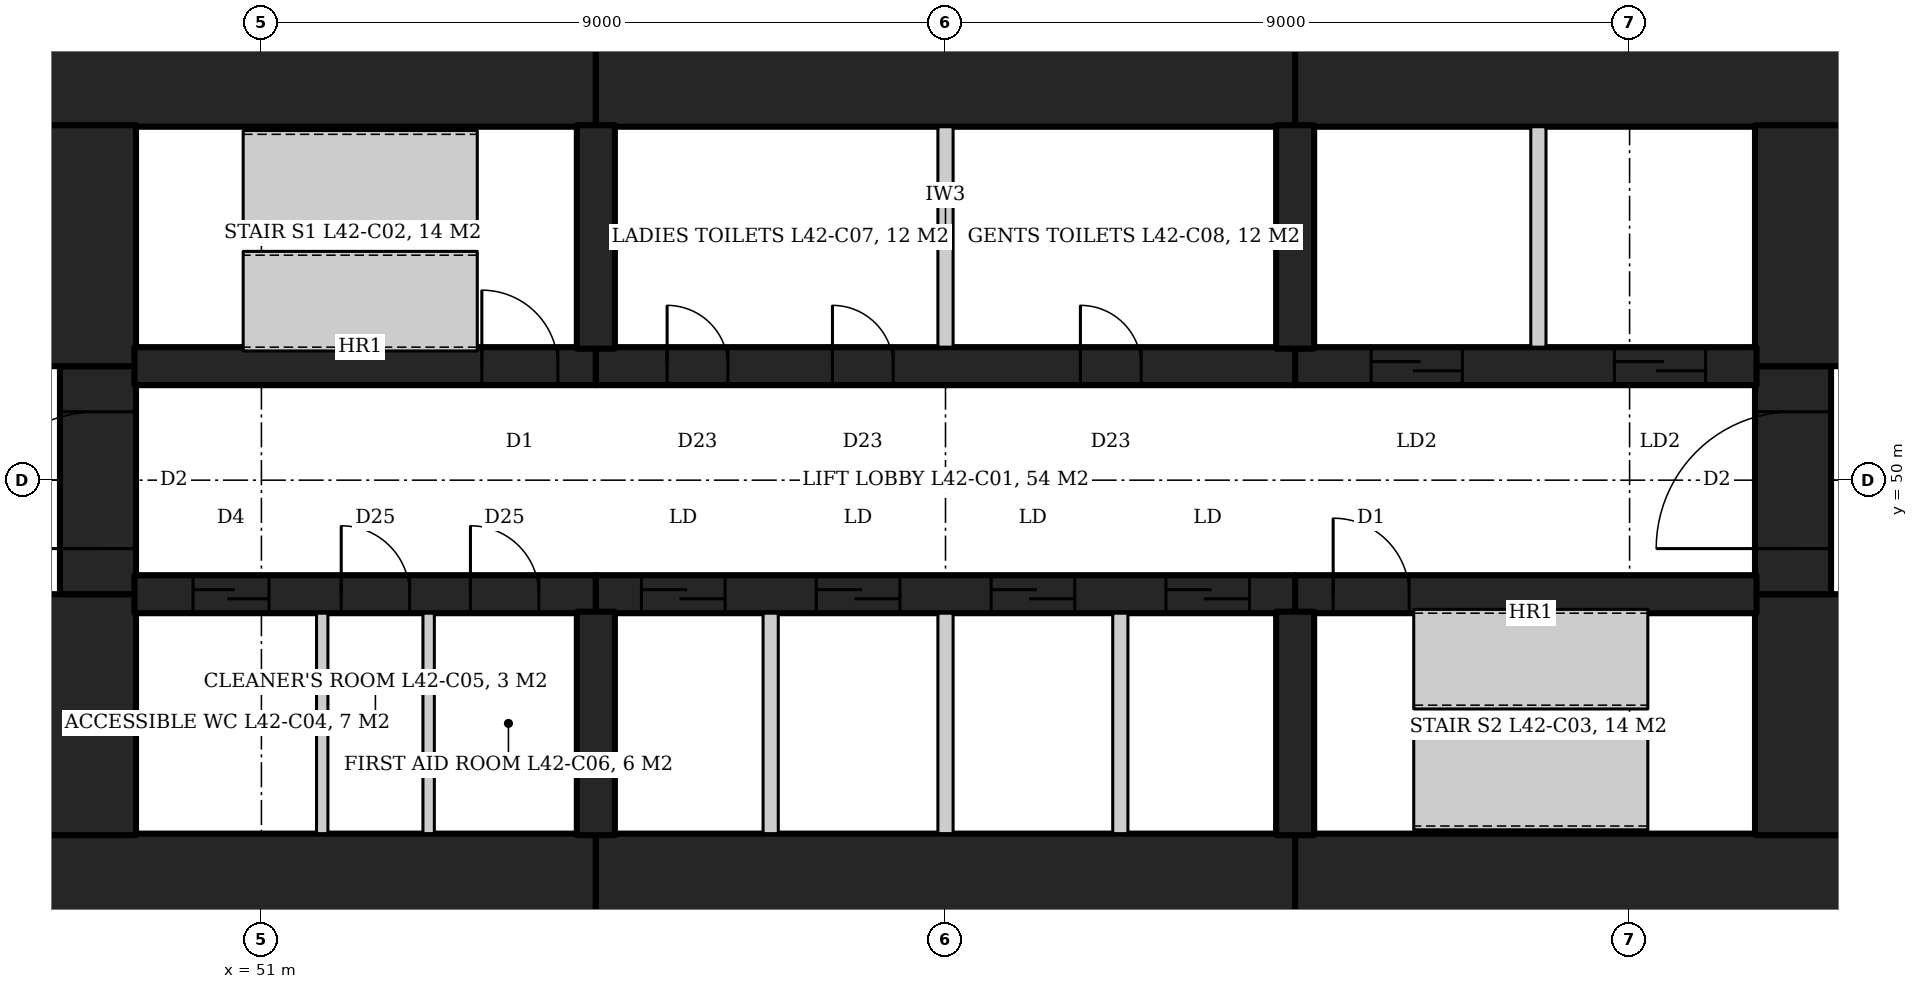
"""IFC4 building model, lengths in metres.
Left out: names, types, materials, properties, quantities, classifications, styles, units other than length and angle.
Written with IfcOpenShell. Run it as: python <this file> out.ifc"""

import sys

from ifc_helpers import new_model, si_unit, direction, frame, frame_2d, origin, place, context, subcontext, project, spatial, rectangle, extrude, element, fill, save


model = new_model("IFC4")
c1 = context("Model", 3, precision=1e-05, world=origin(), true_north=direction((0.0, 1.0)))
c2 = subcontext(c1, "Body", "Model", "MODEL_VIEW")
j1 = project(units=[si_unit("LENGTHUNIT", "METRE"), si_unit("PLANEANGLEUNIT", "RADIAN")], contexts=[c1])
p1 = place(None, origin())
s1 = spatial("IfcSite", under=j1, at=p1, CompositionType="ELEMENT")
p2 = place(p1, origin())
s2 = spatial("IfcBuilding", under=s1, at=p2, CompositionType="ELEMENT")
p3 = place(p2, frame((0.0, 0.0, 185.6)))
s3 = spatial("IfcBuildingStorey", under=s2, at=p3, CompositionType="ELEMENT", Elevation=185.6)
p4 = place(p3, frame((47.55, 55.55, 0.0), z_axis=(0.0, 0.0, 1.0), x_axis=(1.0, 0.0, 0.0)))
e1 = element("IfcWall", 1, at=p4, inside=s3, PredefinedType="SHEAR", context=c2, shape_type="SweptSolid", body=[
    extrude(rectangle(XDim=7.85, YDim=1.8, at=frame_2d((3.925, 0.0))), origin(), (0.0, 0.0, 1.0), 4.2),
])
p5 = place(p3, frame((55.4, 55.55, 0.0), z_axis=(0.0, 0.0, 1.0), x_axis=(1.0, 0.0, 0.0)))
e2 = element("IfcWall", 2, at=p5, inside=s3, PredefinedType="SHEAR", context=c2, shape_type="SweptSolid", body=[
    extrude(rectangle(XDim=9.2, YDim=1.8, at=frame_2d((4.6, 0.0))), origin(), (0.0, 0.0, 1.0), 4.2),
])
for number, where, z_axis, x_axis in (
    (3, (64.6, 55.55, 0.0), (0.0, 0.0, 1.0), (1.0, 0.0, 0.0)),
    (4, (47.55, 44.45, 0.0), (0.0, 0.0, 1.0), (1.0, 0.0, 0.0)),
):
    element("IfcWall", number, at=place(p3, frame(where, z_axis=z_axis, x_axis=x_axis)), inside=s3, PredefinedType="SHEAR", context=c2, shape_type="SweptSolid", body=[
        extrude(rectangle(XDim=7.85, YDim=1.8, at=frame_2d((3.925, 0.0))), origin(), (0.0, 0.0, 1.0), 4.2),
    ])
p6 = place(p3, frame((55.4, 44.45, 0.0), z_axis=(0.0, 0.0, 1.0), x_axis=(1.0, 0.0, 0.0)))
e5 = element("IfcWall", 5, at=p6, inside=s3, PredefinedType="SHEAR", context=c2, shape_type="SweptSolid", body=[
    extrude(rectangle(XDim=9.2, YDim=1.8, at=frame_2d((4.6, 0.0))), origin(), (0.0, 0.0, 1.0), 4.2),
])
p7 = place(p3, frame((64.6, 44.45, 0.0), z_axis=(0.0, 0.0, 1.0), x_axis=(1.0, 0.0, 0.0)))
e6 = element("IfcWall", 6, at=p7, inside=s3, PredefinedType="SHEAR", context=c2, shape_type="SweptSolid", body=[
    extrude(rectangle(XDim=7.85, YDim=1.8, at=frame_2d((3.925, 0.0))), origin(), (0.0, 0.0, 1.0), 4.2),
])
p8 = place(p3, frame((71.55, 45.33, 0.0), z_axis=(0.0, 0.0, 1.0), x_axis=(0.0, 1.0, 0.0)))
e7 = element("IfcWall", 7, at=p8, inside=s3, PredefinedType="SHEAR", context=c2, shape_type="SweptSolid", body=[
    extrude(rectangle(XDim=3.17, YDim=1.8, at=frame_2d((1.585, 0.0))), origin(), (0.0, 0.0, 1.0), 4.2),
])
p9 = place(p3, frame((71.15, 48.5, 0.0), z_axis=(0.0, 0.0, 1.0), x_axis=(0.0, 1.0, 0.0)))
e8 = element("IfcWall", 8, at=p9, inside=s3, PredefinedType="SHEAR", context=c2, shape_type="SweptSolid", body=[
    extrude(rectangle(XDim=3.0, YDim=1.0, at=frame_2d((1.5, 0.0))), origin(), (0.0, 0.0, 1.0), 4.2),
])
p10 = place(p9, frame((0.6, 0.0, 0.0)))
e9 = element("IfcOpeningElement", 9, at=p10, cuts=e8, PredefinedType="OPENING", context=c2, shape_type="SweptSolid", body=[
    extrude(rectangle(XDim=1.8, YDim=2.1, at=frame_2d((0.9, 1.05))), frame((0.0, 0.51, 0.0), z_axis=(0.0, -1.0, 0.0), x_axis=(1.0, 0.0, 0.0)), (0.0, 0.0, 1.0), 1.02),
])
for number, where, z_axis, x_axis in (
    (10, (71.55, 51.5, 0.0), (0.0, 0.0, 1.0), (0.0, 1.0, 0.0)),
    (11, (48.45, 45.33, 0.0), (0.0, 0.0, 1.0), (0.0, 1.0, 0.0)),
):
    element("IfcWall", number, at=place(p3, frame(where, z_axis=z_axis, x_axis=x_axis)), inside=s3, PredefinedType="SHEAR", context=c2, shape_type="SweptSolid", body=[
        extrude(rectangle(XDim=3.17, YDim=1.8, at=frame_2d((1.585, 0.0))), origin(), (0.0, 0.0, 1.0), 4.2),
    ])
p11 = place(p3, frame((48.85, 48.5, 0.0), z_axis=(0.0, 0.0, 1.0), x_axis=(0.0, 1.0, 0.0)))
e12 = element("IfcWall", 12, at=p11, inside=s3, PredefinedType="SHEAR", context=c2, shape_type="SweptSolid", body=[
    extrude(rectangle(XDim=3.0, YDim=1.0, at=frame_2d((1.5, 0.0))), origin(), (0.0, 0.0, 1.0), 4.2),
])
p12 = place(p11, frame((0.6, 0.0, 0.0)))
e13 = element("IfcOpeningElement", 13, at=p12, cuts=e12, PredefinedType="OPENING", context=c2, shape_type="SweptSolid", body=[
    extrude(rectangle(XDim=1.8, YDim=2.1, at=frame_2d((0.9, 1.05))), frame((0.0, 0.51, 0.0), z_axis=(0.0, -1.0, 0.0), x_axis=(1.0, 0.0, 0.0)), (0.0, 0.0, 1.0), 1.02),
])
p13 = place(p3, frame((48.45, 51.5, 0.0), z_axis=(0.0, 0.0, 1.0), x_axis=(0.0, 1.0, 0.0)))
e14 = element("IfcWall", 14, at=p13, inside=s3, PredefinedType="SHEAR", context=c2, shape_type="SweptSolid", body=[
    extrude(rectangle(XDim=3.17, YDim=1.8, at=frame_2d((1.585, 0.0))), origin(), (0.0, 0.0, 1.0), 4.2),
])
p14 = place(p3, frame((49.33, 51.5, 0.0), z_axis=(0.0, 0.0, 1.0), x_axis=(1.0, 0.0, 0.0)))
e15 = element("IfcWall", 15, at=p14, inside=s3, PredefinedType="SHEAR", context=c2, shape_type="SweptSolid", body=[
    extrude(rectangle(XDim=6.07, YDim=0.5, at=frame_2d((3.035, 0.0))), origin(), (0.0, 0.0, 1.0), 4.2),
])
p15 = place(p14, frame((4.57, 0.0, 0.0)))
e16 = element("IfcOpeningElement", 16, at=p15, cuts=e15, PredefinedType="OPENING", context=c2, shape_type="SweptSolid", body=[
    extrude(rectangle(XDim=1.0, YDim=2.1, at=frame_2d((0.5, 1.05))), frame((0.0, 0.26, 0.0), z_axis=(0.0, -1.0, 0.0), x_axis=(1.0, 0.0, 0.0)), (0.0, 0.0, 1.0), 0.52),
])
p16 = place(p3, frame((55.4, 51.5, 0.0), z_axis=(0.0, 0.0, 1.0), x_axis=(1.0, 0.0, 0.0)))
e17 = element("IfcWall", 17, at=p16, inside=s3, PredefinedType="SHEAR", context=c2, shape_type="SweptSolid", body=[
    extrude(rectangle(XDim=9.2, YDim=0.5, at=frame_2d((4.6, 0.0))), origin(), (0.0, 0.0, 1.0), 4.2),
])
p17 = place(p16, frame((0.938, 0.0, 0.0)))
e18 = element("IfcOpeningElement", 18, at=p17, cuts=e17, PredefinedType="OPENING", context=c2, shape_type="SweptSolid", body=[
    extrude(rectangle(XDim=0.8, YDim=2.1, at=frame_2d((0.4, 1.05))), frame((0.0, 0.26, 0.0), z_axis=(0.0, -1.0, 0.0), x_axis=(1.0, 0.0, 0.0)), (0.0, 0.0, 1.0), 0.52),
])
p18 = place(p16, frame((3.113, 0.0, 0.0)))
e19 = element("IfcOpeningElement", 19, at=p18, cuts=e17, PredefinedType="OPENING", context=c2, shape_type="SweptSolid", body=[
    extrude(rectangle(XDim=0.8, YDim=2.1, at=frame_2d((0.4, 1.05))), frame((0.0, 0.26, 0.0), z_axis=(0.0, -1.0, 0.0), x_axis=(1.0, 0.0, 0.0)), (0.0, 0.0, 1.0), 0.52),
])
p19 = place(p16, frame((6.375, 0.0, 0.0)))
e20 = element("IfcOpeningElement", 20, at=p19, cuts=e17, PredefinedType="OPENING", context=c2, shape_type="SweptSolid", body=[
    extrude(rectangle(XDim=0.8, YDim=2.1, at=frame_2d((0.4, 1.05))), frame((0.0, 0.26, 0.0), z_axis=(0.0, -1.0, 0.0), x_axis=(1.0, 0.0, 0.0)), (0.0, 0.0, 1.0), 0.52),
])
p20 = place(p3, frame((64.6, 51.5, 0.0), z_axis=(0.0, 0.0, 1.0), x_axis=(1.0, 0.0, 0.0)))
e21 = element("IfcWall", 21, at=p20, inside=s3, PredefinedType="SHEAR", context=c2, shape_type="SweptSolid", body=[
    extrude(rectangle(XDim=6.07, YDim=0.5, at=frame_2d((3.035, 0.0))), origin(), (0.0, 0.0, 1.0), 4.2),
])
p21 = place(p20, frame((1.0, 0.0, 0.0)))
e22 = element("IfcOpeningElement", 22, at=p21, cuts=e21, PredefinedType="OPENING", context=c2, shape_type="SweptSolid", body=[
    extrude(rectangle(XDim=1.2, YDim=2.1, at=frame_2d((0.6, 1.05))), frame((0.0, 0.26, 0.0), z_axis=(0.0, -1.0, 0.0), x_axis=(1.0, 0.0, 0.0)), (0.0, 0.0, 1.0), 0.52),
])
p22 = place(p20, frame((4.2, 0.0, 0.0)))
e23 = element("IfcOpeningElement", 23, at=p22, cuts=e21, PredefinedType="OPENING", context=c2, shape_type="SweptSolid", body=[
    extrude(rectangle(XDim=1.2, YDim=2.1, at=frame_2d((0.6, 1.05))), frame((0.0, 0.26, 0.0), z_axis=(0.0, -1.0, 0.0), x_axis=(1.0, 0.0, 0.0)), (0.0, 0.0, 1.0), 0.52),
])
p23 = place(p3, frame((49.33, 48.5, 0.0), z_axis=(0.0, 0.0, 1.0), x_axis=(1.0, 0.0, 0.0)))
e24 = element("IfcWall", 24, at=p23, inside=s3, PredefinedType="SHEAR", context=c2, shape_type="SweptSolid", body=[
    extrude(rectangle(XDim=6.07, YDim=0.5, at=frame_2d((3.035, 0.0))), origin(), (0.0, 0.0, 1.0), 4.2),
])
p24 = place(p23, frame((0.77, 0.0, 0.0)))
e25 = element("IfcOpeningElement", 25, at=p24, cuts=e24, PredefinedType="OPENING", context=c2, shape_type="SweptSolid", body=[
    extrude(rectangle(XDim=1.0, YDim=2.1, at=frame_2d((0.5, 1.05))), frame((0.0, 0.26, 0.0), z_axis=(0.0, -1.0, 0.0), x_axis=(1.0, 0.0, 0.0)), (0.0, 0.0, 1.0), 0.52),
])
p25 = place(p23, frame((2.72, 0.0, 0.0)))
e26 = element("IfcOpeningElement", 26, at=p25, cuts=e24, PredefinedType="OPENING", context=c2, shape_type="SweptSolid", body=[
    extrude(rectangle(XDim=0.9, YDim=2.1, at=frame_2d((0.45, 1.05))), frame((0.0, 0.26, 0.0), z_axis=(0.0, -1.0, 0.0), x_axis=(1.0, 0.0, 0.0)), (0.0, 0.0, 1.0), 0.52),
])
p26 = place(p23, frame((4.42, 0.0, 0.0)))
e27 = element("IfcOpeningElement", 27, at=p26, cuts=e24, PredefinedType="OPENING", context=c2, shape_type="SweptSolid", body=[
    extrude(rectangle(XDim=0.9, YDim=2.1, at=frame_2d((0.45, 1.05))), frame((0.0, 0.26, 0.0), z_axis=(0.0, -1.0, 0.0), x_axis=(1.0, 0.0, 0.0)), (0.0, 0.0, 1.0), 0.52),
])
p27 = place(p3, frame((55.4, 48.5, 0.0), z_axis=(0.0, 0.0, 1.0), x_axis=(1.0, 0.0, 0.0)))
e28 = element("IfcWall", 28, at=p27, inside=s3, PredefinedType="SHEAR", context=c2, shape_type="SweptSolid", body=[
    extrude(rectangle(XDim=9.2, YDim=0.5, at=frame_2d((4.6, 0.0))), origin(), (0.0, 0.0, 1.0), 4.2),
])
p28 = place(p27, frame((0.6, 0.0, 0.0)))
e29 = element("IfcOpeningElement", 29, at=p28, cuts=e28, PredefinedType="OPENING", context=c2, shape_type="SweptSolid", body=[
    extrude(rectangle(XDim=1.1, YDim=2.1, at=frame_2d((0.55, 1.05))), frame((0.0, 0.26, 0.0), z_axis=(0.0, -1.0, 0.0), x_axis=(1.0, 0.0, 0.0)), (0.0, 0.0, 1.0), 0.52),
])
p29 = place(p27, frame((2.9, 0.0, 0.0)))
e30 = element("IfcOpeningElement", 30, at=p29, cuts=e28, PredefinedType="OPENING", context=c2, shape_type="SweptSolid", body=[
    extrude(rectangle(XDim=1.1, YDim=2.1, at=frame_2d((0.55, 1.05))), frame((0.0, 0.26, 0.0), z_axis=(0.0, -1.0, 0.0), x_axis=(1.0, 0.0, 0.0)), (0.0, 0.0, 1.0), 0.52),
])
p30 = place(p27, frame((5.2, 0.0, 0.0)))
e31 = element("IfcOpeningElement", 31, at=p30, cuts=e28, PredefinedType="OPENING", context=c2, shape_type="SweptSolid", body=[
    extrude(rectangle(XDim=1.1, YDim=2.1, at=frame_2d((0.55, 1.05))), frame((0.0, 0.26, 0.0), z_axis=(0.0, -1.0, 0.0), x_axis=(1.0, 0.0, 0.0)), (0.0, 0.0, 1.0), 0.52),
])
p31 = place(p27, frame((7.5, 0.0, 0.0)))
e32 = element("IfcOpeningElement", 32, at=p31, cuts=e28, PredefinedType="OPENING", context=c2, shape_type="SweptSolid", body=[
    extrude(rectangle(XDim=1.1, YDim=2.1, at=frame_2d((0.55, 1.05))), frame((0.0, 0.26, 0.0), z_axis=(0.0, -1.0, 0.0), x_axis=(1.0, 0.0, 0.0)), (0.0, 0.0, 1.0), 0.52),
])
p32 = place(p3, frame((64.6, 48.5, 0.0), z_axis=(0.0, 0.0, 1.0), x_axis=(1.0, 0.0, 0.0)))
e33 = element("IfcWall", 33, at=p32, inside=s3, PredefinedType="SHEAR", context=c2, shape_type="SweptSolid", body=[
    extrude(rectangle(XDim=6.07, YDim=0.5, at=frame_2d((3.035, 0.0))), origin(), (0.0, 0.0, 1.0), 4.2),
])
p33 = place(p32, frame((0.5, 0.0, 0.0)))
e34 = element("IfcOpeningElement", 34, at=p33, cuts=e33, PredefinedType="OPENING", context=c2, shape_type="SweptSolid", body=[
    extrude(rectangle(XDim=1.0, YDim=2.1, at=frame_2d((0.5, 1.05))), frame((0.0, 0.26, 0.0), z_axis=(0.0, -1.0, 0.0), x_axis=(1.0, 0.0, 0.0)), (0.0, 0.0, 1.0), 0.52),
])
for number, where, z_axis, x_axis in (
    (35, (55.4, 51.73, 0.0), (0.0, 0.0, 1.0), (0.0, 1.0, 0.0)),
    (36, (64.6, 51.73, 0.0), (0.0, 0.0, 1.0), (0.0, 1.0, 0.0)),
    (37, (55.4, 48.27, 0.0), (0.0, 0.0, 1.0), (0.0, -1.0, 0.0)),
    (38, (64.6, 48.27, 0.0), (0.0, 0.0, 1.0), (0.0, -1.0, 0.0)),
):
    element("IfcWall", number, at=place(p3, frame(where, z_axis=z_axis, x_axis=x_axis)), inside=s3, PredefinedType="SHEAR", context=c2, shape_type="SweptSolid", body=[
        extrude(rectangle(XDim=2.94, YDim=0.5, at=frame_2d((1.47, 0.0))), origin(), (0.0, 0.0, 1.0), 4.2),
    ])
for number, where, z_axis, x_axis in (
    (39, (57.7, 45.35, 0.0), (0.0, 0.0, 1.0), (0.0, 1.0, 0.0)),
    (40, (60.0, 45.35, 0.0), (0.0, 0.0, 1.0), (0.0, 1.0, 0.0)),
    (41, (62.3, 45.35, 0.0), (0.0, 0.0, 1.0), (0.0, 1.0, 0.0)),
    (42, (67.8, 51.75, 0.0), (0.0, 0.0, 1.0), (0.0, 1.0, 0.0)),
):
    element("IfcWall", number, at=place(p3, frame(where, z_axis=z_axis, x_axis=x_axis)), inside=s3, PredefinedType="PARTITIONING", context=c2, shape_type="SweptSolid", body=[
        extrude(rectangle(XDim=2.9, YDim=0.2, at=frame_2d((1.45, 0.0))), origin(), (0.0, 0.0, 1.0), 4.2),
    ])
for number, where, z_axis, x_axis in (
    (43, (51.8, 45.35, 0.0), (0.0, 0.0, 1.0), (0.0, 1.0, 0.0)),
    (44, (53.2, 45.35, 0.0), (0.0, 0.0, 1.0), (0.0, 1.0, 0.0)),
):
    element("IfcWall", number, at=place(p3, frame(where, z_axis=z_axis, x_axis=x_axis)), inside=s3, PredefinedType="PARTITIONING", context=c2, shape_type="SweptSolid", body=[
        extrude(rectangle(XDim=2.9, YDim=0.15, at=frame_2d((1.45, 0.0))), origin(), (0.0, 0.0, 1.0), 4.04),
    ])
p34 = place(p3, frame((60.0, 51.75, 0.0), z_axis=(0.0, 0.0, 1.0), x_axis=(0.0, 1.0, 0.0)))
e45 = element("IfcWall", 45, at=p34, inside=s3, PredefinedType="PARTITIONING", context=c2, shape_type="SweptSolid", body=[
    extrude(rectangle(XDim=2.9, YDim=0.2, at=frame_2d((1.45, 0.0))), origin(), (0.0, 0.0, 1.0), 4.04),
])
p35 = place(p15, origin())
e46 = element("IfcDoor", 46, at=p35, inside=s3, OperationType="SINGLE_SWING_LEFT", PredefinedType="DOOR", context=c2, shape_type="SweptSolid", body=[
    extrude(rectangle(XDim=1.0, YDim=2.1, at=frame_2d((0.5, 1.05))), frame((0.0, 0.025, 0.0), z_axis=(0.0, -1.0, 0.0), x_axis=(1.0, 0.0, 0.0)), (0.0, 0.0, 1.0), 0.05),
])
fill(e16, e46)
p36 = place(p33, origin())
e47 = element("IfcDoor", 47, at=p36, inside=s3, OperationType="SINGLE_SWING_LEFT", PredefinedType="DOOR", context=c2, shape_type="SweptSolid", body=[
    extrude(rectangle(XDim=1.0, YDim=2.1, at=frame_2d((0.5, 1.05))), frame((0.0, 0.025, 0.0), z_axis=(0.0, -1.0, 0.0), x_axis=(1.0, 0.0, 0.0)), (0.0, 0.0, 1.0), 0.05),
])
fill(e34, e47)
p37 = place(p21, origin())
e48 = element("IfcDoor", 48, at=p37, inside=s3, OperationType="SLIDING_TO_LEFT", PredefinedType="DOOR", context=c2, shape_type="SweptSolid", body=[
    extrude(rectangle(XDim=1.2, YDim=2.1, at=frame_2d((0.6, 1.05))), frame((0.0, 0.025, 0.0), z_axis=(0.0, -1.0, 0.0), x_axis=(1.0, 0.0, 0.0)), (0.0, 0.0, 1.0), 0.05),
])
fill(e22, e48)
p38 = place(p22, origin())
e49 = element("IfcDoor", 49, at=p38, inside=s3, OperationType="SLIDING_TO_LEFT", PredefinedType="DOOR", context=c2, shape_type="SweptSolid", body=[
    extrude(rectangle(XDim=1.2, YDim=2.1, at=frame_2d((0.6, 1.05))), frame((0.0, 0.025, 0.0), z_axis=(0.0, -1.0, 0.0), x_axis=(1.0, 0.0, 0.0)), (0.0, 0.0, 1.0), 0.05),
])
fill(e23, e49)
p39 = place(p28, origin())
e50 = element("IfcDoor", 50, at=p39, inside=s3, OperationType="SLIDING_TO_LEFT", PredefinedType="DOOR", context=c2, shape_type="SweptSolid", body=[
    extrude(rectangle(XDim=1.1, YDim=2.1, at=frame_2d((0.55, 1.05))), frame((0.0, 0.025, 0.0), z_axis=(0.0, -1.0, 0.0), x_axis=(1.0, 0.0, 0.0)), (0.0, 0.0, 1.0), 0.05),
])
fill(e29, e50)
p40 = place(p29, origin())
e51 = element("IfcDoor", 51, at=p40, inside=s3, OperationType="SLIDING_TO_LEFT", PredefinedType="DOOR", context=c2, shape_type="SweptSolid", body=[
    extrude(rectangle(XDim=1.1, YDim=2.1, at=frame_2d((0.55, 1.05))), frame((0.0, 0.025, 0.0), z_axis=(0.0, -1.0, 0.0), x_axis=(1.0, 0.0, 0.0)), (0.0, 0.0, 1.0), 0.05),
])
fill(e30, e51)
p41 = place(p30, origin())
e52 = element("IfcDoor", 52, at=p41, inside=s3, OperationType="SLIDING_TO_LEFT", PredefinedType="DOOR", context=c2, shape_type="SweptSolid", body=[
    extrude(rectangle(XDim=1.1, YDim=2.1, at=frame_2d((0.55, 1.05))), frame((0.0, 0.025, 0.0), z_axis=(0.0, -1.0, 0.0), x_axis=(1.0, 0.0, 0.0)), (0.0, 0.0, 1.0), 0.05),
])
fill(e31, e52)
p42 = place(p31, origin())
e53 = element("IfcDoor", 53, at=p42, inside=s3, OperationType="SLIDING_TO_LEFT", PredefinedType="DOOR", context=c2, shape_type="SweptSolid", body=[
    extrude(rectangle(XDim=1.1, YDim=2.1, at=frame_2d((0.55, 1.05))), frame((0.0, 0.025, 0.0), z_axis=(0.0, -1.0, 0.0), x_axis=(1.0, 0.0, 0.0)), (0.0, 0.0, 1.0), 0.05),
])
fill(e32, e53)
p43 = place(p24, origin())
e54 = element("IfcDoor", 54, at=p43, inside=s3, OperationType="SLIDING_TO_LEFT", PredefinedType="DOOR", context=c2, shape_type="SweptSolid", body=[
    extrude(rectangle(XDim=1.0, YDim=2.1, at=frame_2d((0.5, 1.05))), frame((0.0, 0.025, 0.0), z_axis=(0.0, -1.0, 0.0), x_axis=(1.0, 0.0, 0.0)), (0.0, 0.0, 1.0), 0.05),
])
fill(e25, e54)
p44 = place(p25, origin())
e55 = element("IfcDoor", 55, at=p44, inside=s3, OperationType="SINGLE_SWING_RIGHT", PredefinedType="DOOR", context=c2, shape_type="SweptSolid", body=[
    extrude(rectangle(XDim=0.9, YDim=2.1, at=frame_2d((0.45, 1.05))), frame((0.0, 0.025, 0.0), z_axis=(0.0, -1.0, 0.0), x_axis=(1.0, 0.0, 0.0)), (0.0, 0.0, 1.0), 0.05),
])
fill(e26, e55)
p45 = place(p26, origin())
e56 = element("IfcDoor", 56, at=p45, inside=s3, OperationType="SINGLE_SWING_RIGHT", PredefinedType="DOOR", context=c2, shape_type="SweptSolid", body=[
    extrude(rectangle(XDim=0.9, YDim=2.1, at=frame_2d((0.45, 1.05))), frame((0.0, 0.025, 0.0), z_axis=(0.0, -1.0, 0.0), x_axis=(1.0, 0.0, 0.0)), (0.0, 0.0, 1.0), 0.05),
])
fill(e27, e56)
p46 = place(p10, origin())
e57 = element("IfcDoor", 57, at=p46, inside=s3, OperationType="DOUBLE_DOOR_DOUBLE_SWING", PredefinedType="DOOR", context=c2, shape_type="SweptSolid", body=[
    extrude(rectangle(XDim=1.8, YDim=2.1, at=frame_2d((0.9, 1.05))), frame((0.0, 0.025, 0.0), z_axis=(0.0, -1.0, 0.0), x_axis=(1.0, 0.0, 0.0)), (0.0, 0.0, 1.0), 0.05),
])
fill(e9, e57)
p47 = place(p12, origin())
e58 = element("IfcDoor", 58, at=p47, inside=s3, OperationType="DOUBLE_DOOR_DOUBLE_SWING", PredefinedType="DOOR", context=c2, shape_type="SweptSolid", body=[
    extrude(rectangle(XDim=1.8, YDim=2.1, at=frame_2d((0.9, 1.05))), frame((0.0, 0.025, 0.0), z_axis=(0.0, -1.0, 0.0), x_axis=(1.0, 0.0, 0.0)), (0.0, 0.0, 1.0), 0.05),
])
fill(e13, e58)
p48 = place(p17, origin())
e59 = element("IfcDoor", 59, at=p48, inside=s3, OperationType="SINGLE_SWING_LEFT", PredefinedType="DOOR", context=c2, shape_type="SweptSolid", body=[
    extrude(rectangle(XDim=0.8, YDim=2.1, at=frame_2d((0.4, 1.05))), frame((0.0, 0.025, 0.0), z_axis=(0.0, -1.0, 0.0), x_axis=(1.0, 0.0, 0.0)), (0.0, 0.0, 1.0), 0.05),
])
fill(e18, e59)
p49 = place(p18, origin())
e60 = element("IfcDoor", 60, at=p49, inside=s3, OperationType="SINGLE_SWING_LEFT", PredefinedType="DOOR", context=c2, shape_type="SweptSolid", body=[
    extrude(rectangle(XDim=0.8, YDim=2.1, at=frame_2d((0.4, 1.05))), frame((0.0, 0.025, 0.0), z_axis=(0.0, -1.0, 0.0), x_axis=(1.0, 0.0, 0.0)), (0.0, 0.0, 1.0), 0.05),
])
fill(e19, e60)
p50 = place(p19, origin())
e61 = element("IfcDoor", 61, at=p50, inside=s3, OperationType="SINGLE_SWING_LEFT", PredefinedType="DOOR", context=c2, shape_type="SweptSolid", body=[
    extrude(rectangle(XDim=0.8, YDim=2.1, at=frame_2d((0.4, 1.05))), frame((0.0, 0.025, 0.0), z_axis=(0.0, -1.0, 0.0), x_axis=(1.0, 0.0, 0.0)), (0.0, 0.0, 1.0), 0.05),
])
fill(e20, e61)
save(model, sys.argv[1])
